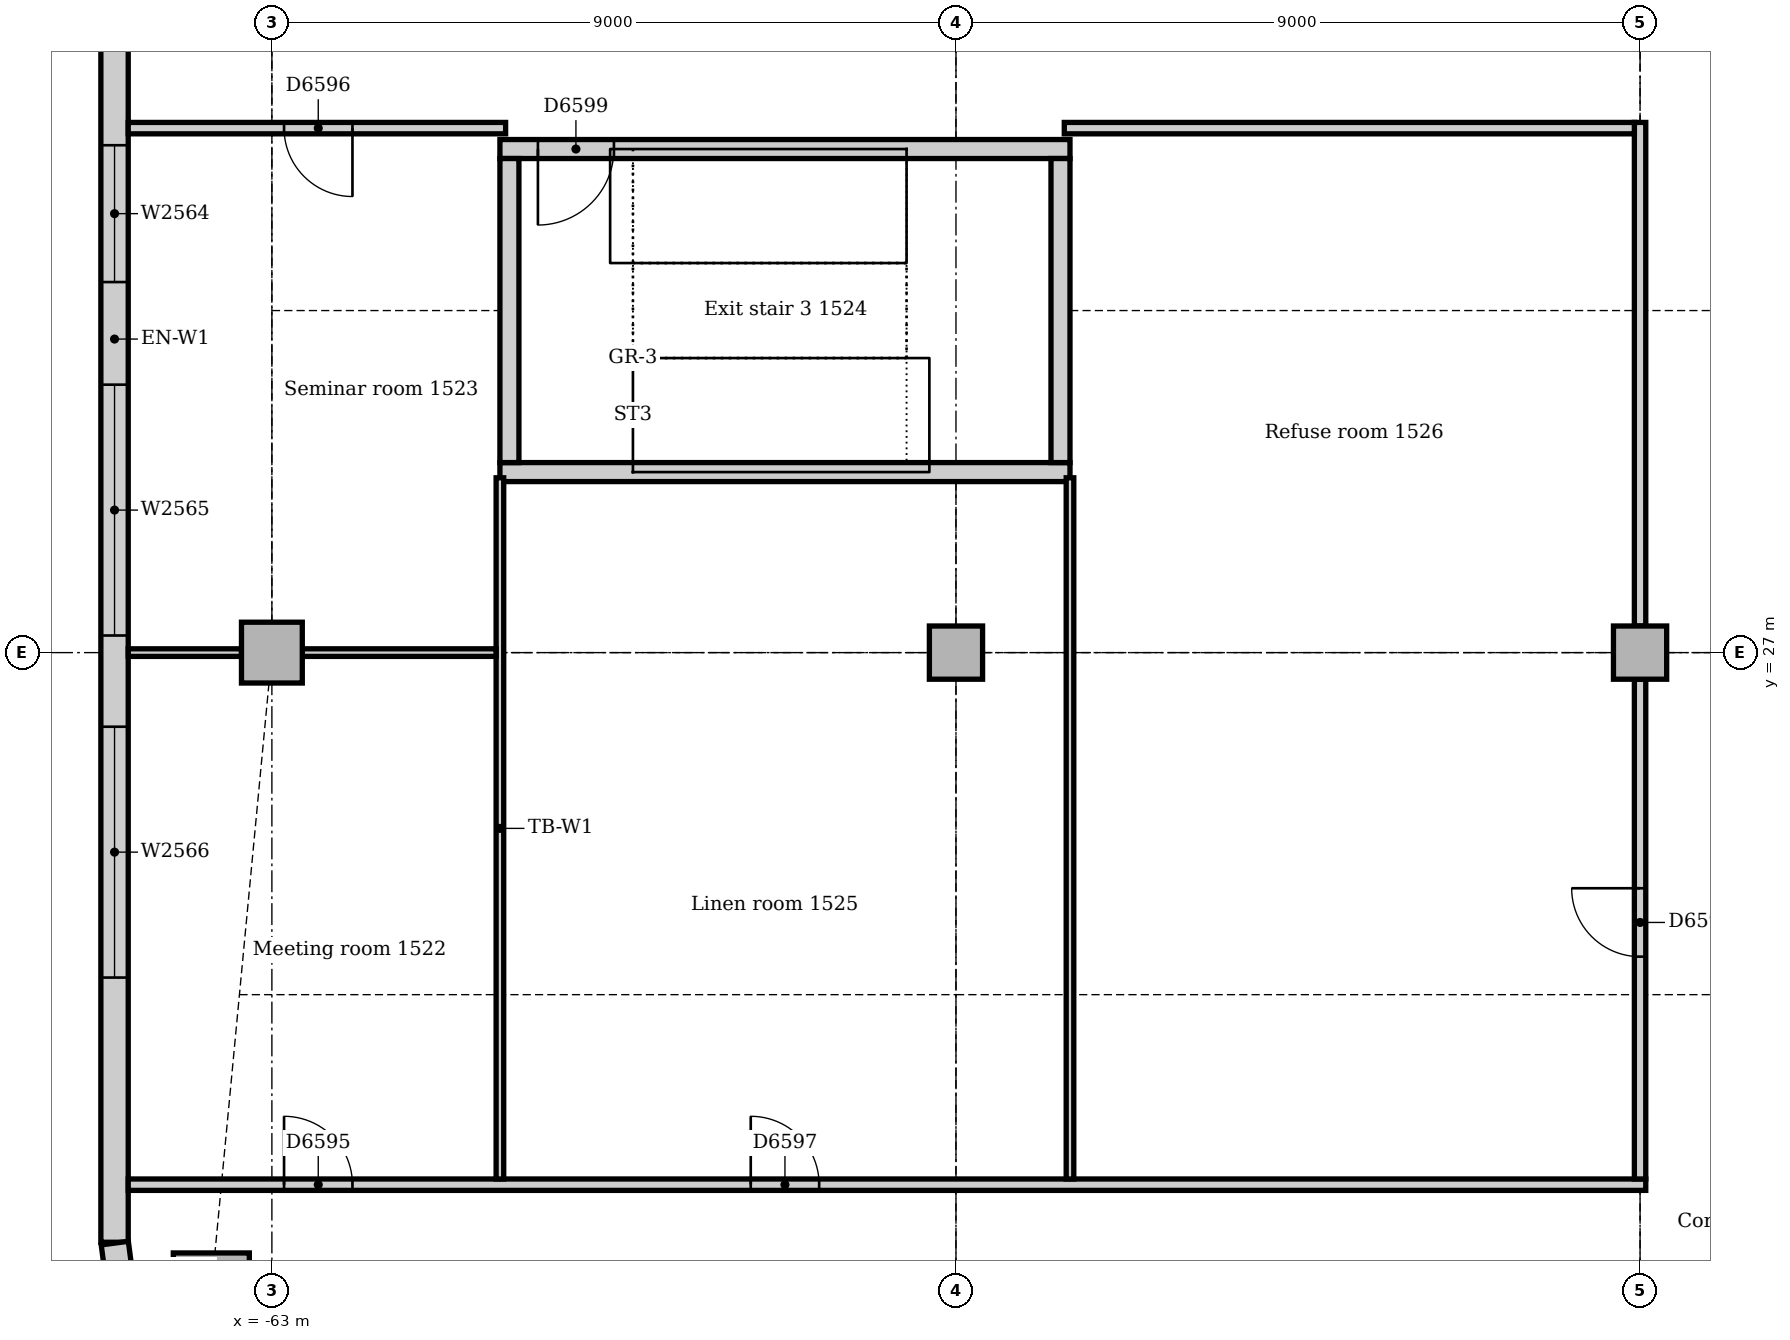
"""IFC4 building model, lengths in metres.
Left out: names, types, materials, properties, quantities, classifications, styles, units other than length and angle.
Written with IfcOpenShell. Run it as: python <this file> out.ifc"""

import sys

from ifc_helpers import new_model, si_unit, direction, frame, frame_2d, origin, origin_2d, place, context, subcontext, project, spatial, rectangle, extrude, element, fill, save


model = new_model("IFC4")
c1 = context("Model", 3, precision=1e-05, world=origin(), true_north=direction((0.0, 1.0)))
c2 = subcontext(c1, "Body", "Model", "MODEL_VIEW")
j1 = project(units=[si_unit("LENGTHUNIT", "METRE"), si_unit("PLANEANGLEUNIT", "RADIAN")], contexts=[c1])
p1 = place(None, origin())
s1 = spatial("IfcSite", under=j1, at=p1, CompositionType="ELEMENT")
p2 = place(p1, origin())
s2 = spatial("IfcBuilding", under=s1, at=p2, CompositionType="ELEMENT")
p3 = place(p2, frame((0.0, 0.0, 67.0)))
s3 = spatial("IfcBuildingStorey", under=s2, at=p3, CompositionType="ELEMENT", Elevation=67.0)
p4 = place(p3, frame((-60.0, 29.375, 0.0), z_axis=(0.0, 0.0, 1.0), x_axis=(1.0, 0.0, 0.0)))
e1 = element("IfcWall", 1, at=p4, inside=s3, PredefinedType="SOLIDWALL", context=c2, shape_type="SweptSolid", body=[
    extrude(rectangle(XDim=7.5, YDim=0.25, at=frame_2d((3.75, 0.0))), origin(), (0.0, 0.0, 1.0), 4.0),
])
p5 = place(p3, frame((-52.5, 33.625, 0.0), z_axis=(0.0, 0.0, 1.0), x_axis=(-1.0, 0.0, 0.0)))
e2 = element("IfcWall", 2, at=p5, inside=s3, PredefinedType="SOLIDWALL", context=c2, shape_type="SweptSolid", body=[
    extrude(rectangle(XDim=7.5, YDim=0.25, at=frame_2d((3.75, 0.0))), origin(), (0.0, 0.0, 1.0), 4.0),
])
p6 = place(p5, frame((6.0, 0.0, 0.0)))
e3 = element("IfcOpeningElement", 3, at=p6, cuts=e2, PredefinedType="OPENING", context=c2, shape_type="SweptSolid", body=[
    extrude(rectangle(XDim=1.0, YDim=2.1, at=frame_2d((0.5, 1.05))), frame((0.0, 0.135, 0.0), z_axis=(0.0, -1.0, 0.0), x_axis=(1.0, 0.0, 0.0)), (0.0, 0.0, 1.0), 0.27),
])
for number, where, z_axis, x_axis in (
    (4, (-52.625, 29.5, 0.0), (0.0, 0.0, 1.0), (0.0, 1.0, 0.0)),
    (5, (-59.875, 33.5, 0.0), (0.0, 0.0, 1.0), (0.0, -1.0, 0.0)),
):
    element("IfcWall", number, at=place(p3, frame(where, z_axis=z_axis, x_axis=x_axis)), inside=s3, PredefinedType="SOLIDWALL", context=c2, shape_type="SweptSolid", body=[
        extrude(rectangle(XDim=4.0, YDim=0.25, at=frame_2d((2.0, 0.0))), origin(), (0.0, 0.0, 1.0), 4.0),
    ])
p7 = place(p3, frame((-63.797, 18.602, 0.0), z_axis=(0.0, 0.0, 1.0), x_axis=(1.0, 0.0, 0.0)))
e6 = element("IfcColumn", 6, at=p7, inside=s3, PredefinedType="COLUMN", context=c2, shape_type="SweptSolid", body=[
    extrude(rectangle(XDim=1.0, YDim=1.0, at=origin_2d()), origin(), (0.0, 0.0, 1.0), 3.85),
])
p8 = place(p3, frame((-63.0, 27.0, 0.0), z_axis=(0.0, 0.0, 1.0), x_axis=(1.0, 0.0, 0.0)))
e7 = element("IfcColumn", 7, at=p8, inside=s3, PredefinedType="COLUMN", context=c2, shape_type="SweptSolid", body=[
    extrude(rectangle(XDim=0.8, YDim=0.8, at=origin_2d()), origin(), (0.0, 0.0, 1.0), 3.85),
])
for number, where, z_axis, x_axis in (
    (8, (-54.0, 27.0, 0.0), (0.0, 0.0, 1.0), (1.0, 0.0, 0.0)),
    (9, (-45.0, 27.0, 0.0), (0.0, 0.0, 1.0), (1.0, 0.0, 0.0)),
):
    element("IfcColumn", number, at=place(p3, frame(where, z_axis=z_axis, x_axis=x_axis)), inside=s3, PredefinedType="COLUMN", context=c2, shape_type="SweptSolid", body=[
        extrude(rectangle(XDim=0.7, YDim=0.7, at=origin_2d()), origin(), (0.0, 0.0, 1.0), 3.85),
    ])
p9 = place(p3, frame((-65.07, 43.007, 0.0), z_axis=(0.0, 0.0, 1.0), x_axis=(0.0, -1.0, 0.0)))
e10 = element("IfcWall", 10, at=p9, inside=s3, PredefinedType="STANDARD", context=c2, shape_type="SweptSolid", body=[
    extrude(rectangle(XDim=23.765, YDim=0.36, at=frame_2d((11.882, 0.0))), origin(), (0.0, 0.0, 1.0), 3.85),
])
p10 = place(p9, frame((4.232, 0.0, 0.9)))
e11 = element("IfcOpeningElement", 11, at=p10, cuts=e10, PredefinedType="OPENING", context=c2, shape_type="SweptSolid", body=[
    extrude(rectangle(XDim=1.8, YDim=1.6, at=frame_2d((0.9, 0.8))), frame((0.0, 0.19, 0.0), z_axis=(0.0, -1.0, 0.0), x_axis=(1.0, 0.0, 0.0)), (0.0, 0.0, 1.0), 0.38),
])
p11 = place(p9, frame((9.332, 0.0, 0.9)))
e12 = element("IfcOpeningElement", 12, at=p11, cuts=e10, PredefinedType="OPENING", context=c2, shape_type="SweptSolid", body=[
    extrude(rectangle(XDim=1.8, YDim=1.6, at=frame_2d((0.9, 0.8))), frame((0.0, 0.19, 0.0), z_axis=(0.0, -1.0, 0.0), x_axis=(1.0, 0.0, 0.0)), (0.0, 0.0, 1.0), 0.38),
])
p12 = place(p9, frame((12.482, 0.0, 0.9)))
e13 = element("IfcOpeningElement", 13, at=p12, cuts=e10, PredefinedType="OPENING", context=c2, shape_type="SweptSolid", body=[
    extrude(rectangle(XDim=3.3, YDim=1.6, at=frame_2d((1.65, 0.8))), frame((0.0, 0.19, 0.0), z_axis=(0.0, -1.0, 0.0), x_axis=(1.0, 0.0, 0.0)), (0.0, 0.0, 1.0), 0.38),
])
p13 = place(p9, frame((16.982, 0.0, 0.9)))
e14 = element("IfcOpeningElement", 14, at=p13, cuts=e10, PredefinedType="OPENING", context=c2, shape_type="SweptSolid", body=[
    extrude(rectangle(XDim=3.3, YDim=1.6, at=frame_2d((1.65, 0.8))), frame((0.0, 0.19, 0.0), z_axis=(0.0, -1.0, 0.0), x_axis=(1.0, 0.0, 0.0)), (0.0, 0.0, 1.0), 0.38),
])
p14 = place(p3, frame((-65.067, 19.231, 0.0), z_axis=(0.0, 0.0, 1.0), x_axis=(0.13055608231, -0.99144092581, 0.0)))
e15 = element("IfcWall", 15, at=p14, inside=s3, PredefinedType="STANDARD", context=c2, shape_type="SweptSolid", body=[
    extrude(rectangle(XDim=0.713, YDim=0.36, at=frame_2d((0.356, 0.0))), origin(), (0.0, 0.0, 1.0), 3.85),
])
p15 = place(p3, frame((-64.89, 20.0, 0.0), z_axis=(0.0, 0.0, 1.0), x_axis=(1.0, 0.0, 0.0)))
e16 = element("IfcWall", 16, at=p15, inside=s3, PredefinedType="PARTITIONING", context=c2, shape_type="SweptSolid", body=[
    extrude(rectangle(XDim=19.965, YDim=0.15, at=frame_2d((9.982, 0.0))), origin(), (0.0, 0.0, 1.0), 3.85),
])
p16 = place(p15, frame((2.05, 0.0, 0.0)))
e17 = element("IfcOpeningElement", 17, at=p16, cuts=e16, PredefinedType="OPENING", context=c2, shape_type="SweptSolid", body=[
    extrude(rectangle(XDim=0.9, YDim=2.1, at=frame_2d((0.45, 1.05))), frame((0.0, 0.085, 0.0), z_axis=(0.0, -1.0, 0.0), x_axis=(1.0, 0.0, 0.0)), (0.0, 0.0, 1.0), 0.17),
])
p17 = place(p15, frame((8.19, 0.0, 0.0)))
e18 = element("IfcOpeningElement", 18, at=p17, cuts=e16, PredefinedType="OPENING", context=c2, shape_type="SweptSolid", body=[
    extrude(rectangle(XDim=0.9, YDim=2.1, at=frame_2d((0.45, 1.05))), frame((0.0, 0.085, 0.0), z_axis=(0.0, -1.0, 0.0), x_axis=(1.0, 0.0, 0.0)), (0.0, 0.0, 1.0), 0.17),
])
p18 = place(p3, frame((-45.0, 20.075, 0.0), z_axis=(0.0, 0.0, 1.0), x_axis=(0.0, 1.0, 0.0)))
e19 = element("IfcWall", 19, at=p18, inside=s3, PredefinedType="PARTITIONING", context=c2, shape_type="SweptSolid", body=[
    extrude(rectangle(XDim=6.575, YDim=0.15, at=frame_2d((3.288, 0.0))), origin(), (0.0, 0.0, 1.0), 3.256),
])
p19 = place(p18, frame((2.925, 0.0, 0.0)))
e20 = element("IfcOpeningElement", 20, at=p19, cuts=e19, PredefinedType="OPENING", context=c2, shape_type="SweptSolid", body=[
    extrude(rectangle(XDim=0.9, YDim=2.1, at=frame_2d((0.45, 1.05))), frame((0.0, 0.085, 0.0), z_axis=(0.0, -1.0, 0.0), x_axis=(1.0, 0.0, 0.0)), (0.0, 0.0, 1.0), 0.17),
])
p20 = place(p3, frame((-45.0, 27.35, 0.0), z_axis=(0.0, 0.0, 1.0), x_axis=(0.0, 1.0, 0.0)))
e21 = element("IfcWall", 21, at=p20, inside=s3, PredefinedType="PARTITIONING", context=c2, shape_type="SweptSolid", body=[
    extrude(rectangle(XDim=6.625, YDim=0.15, at=frame_2d((3.312, 0.0))), origin(), (0.0, 0.0, 1.0), 3.256),
])
p21 = place(p3, frame((-52.575, 33.9, 0.0), z_axis=(0.0, 0.0, 1.0), x_axis=(1.0, 0.0, 0.0)))
e22 = element("IfcWall", 22, at=p21, inside=s3, PredefinedType="PARTITIONING", context=c2, shape_type="SweptSolid", body=[
    extrude(rectangle(XDim=7.5, YDim=0.15, at=frame_2d((3.75, 0.0))), origin(), (0.0, 0.0, 1.0), 3.85),
])
p22 = place(p3, frame((-64.89, 33.9, 0.0), z_axis=(0.0, 0.0, 1.0), x_axis=(1.0, 0.0, 0.0)))
e23 = element("IfcWall", 23, at=p22, inside=s3, PredefinedType="PARTITIONING", context=c2, shape_type="SweptSolid", body=[
    extrude(rectangle(XDim=4.965, YDim=0.15, at=frame_2d((2.482, 0.0))), origin(), (0.0, 0.0, 1.0), 3.85),
])
p23 = place(p22, frame((2.05, 0.0, 0.0)))
e24 = element("IfcOpeningElement", 24, at=p23, cuts=e23, PredefinedType="OPENING", context=c2, shape_type="SweptSolid", body=[
    extrude(rectangle(XDim=0.9, YDim=2.1, at=frame_2d((0.45, 1.05))), frame((0.0, 0.085, 0.0), z_axis=(0.0, -1.0, 0.0), x_axis=(1.0, 0.0, 0.0)), (0.0, 0.0, 1.0), 0.17),
])
for number, where, z_axis, x_axis in (
    (25, (-60.0, 20.075, 0.0), (0.0, 0.0, 1.0), (0.0, 1.0, 0.0)),
    (26, (-52.5, 20.075, 0.0), (0.0, 0.0, 1.0), (0.0, 1.0, 0.0)),
):
    element("IfcWall", number, at=place(p3, frame(where, z_axis=z_axis, x_axis=x_axis)), inside=s3, PredefinedType="PARTITIONING", context=c2, shape_type="SweptSolid", body=[
        extrude(rectangle(XDim=9.225, YDim=0.1, at=frame_2d((4.612, 0.0))), origin(), (0.0, 0.0, 1.0), 3.85),
    ])
p24 = place(p3, frame((-62.6, 27.0, 0.0), z_axis=(0.0, 0.0, 1.0), x_axis=(1.0, 0.0, 0.0)))
e27 = element("IfcWall", 27, at=p24, inside=s3, PredefinedType="PARTITIONING", context=c2, shape_type="SweptSolid", body=[
    extrude(rectangle(XDim=2.55, YDim=0.1, at=frame_2d((1.275, 0.0))), origin(), (0.0, 0.0, 1.0), 3.158),
])
p25 = place(p3, frame((-64.89, 27.0, 0.0), z_axis=(0.0, 0.0, 1.0), x_axis=(1.0, 0.0, 0.0)))
e28 = element("IfcWall", 28, at=p25, inside=s3, PredefinedType="PARTITIONING", context=c2, shape_type="SweptSolid", body=[
    extrude(rectangle(XDim=1.49, YDim=0.1, at=frame_2d((0.745, 0.0))), origin(), (0.0, 0.0, 1.0), 3.85),
])
p26 = place(p11, origin())
e29 = element("IfcWindow", 29, at=p26, inside=s3, PartitioningType="SINGLE_PANEL", PredefinedType="WINDOW", context=c2, shape_type="SweptSolid", body=[
    extrude(rectangle(XDim=1.8, YDim=1.6, at=frame_2d((0.9, 0.8))), frame((0.0, 0.13, 0.0), z_axis=(0.0, -1.0, 0.0), x_axis=(1.0, 0.0, 0.0)), (0.0, 0.0, 1.0), 0.06),
])
fill(e12, e29)
p27 = place(p12, origin())
e30 = element("IfcWindow", 30, at=p27, inside=s3, PartitioningType="SINGLE_PANEL", PredefinedType="WINDOW", context=c2, shape_type="SweptSolid", body=[
    extrude(rectangle(XDim=3.3, YDim=1.6, at=frame_2d((1.65, 0.8))), frame((0.0, 0.13, 0.0), z_axis=(0.0, -1.0, 0.0), x_axis=(1.0, 0.0, 0.0)), (0.0, 0.0, 1.0), 0.06),
])
fill(e13, e30)
p28 = place(p13, origin())
e31 = element("IfcWindow", 31, at=p28, inside=s3, PartitioningType="SINGLE_PANEL", PredefinedType="WINDOW", context=c2, shape_type="SweptSolid", body=[
    extrude(rectangle(XDim=3.3, YDim=1.6, at=frame_2d((1.65, 0.8))), frame((0.0, 0.13, 0.0), z_axis=(0.0, -1.0, 0.0), x_axis=(1.0, 0.0, 0.0)), (0.0, 0.0, 1.0), 0.06),
])
fill(e14, e31)
p29 = place(p16, origin())
e32 = element("IfcDoor", 32, at=p29, inside=s3, OperationType="SINGLE_SWING_LEFT", PredefinedType="DOOR", context=c2, shape_type="SweptSolid", body=[
    extrude(rectangle(XDim=0.9, YDim=2.1, at=frame_2d((0.45, 1.05))), frame((0.0, 0.025, 0.0), z_axis=(0.0, -1.0, 0.0), x_axis=(1.0, 0.0, 0.0)), (0.0, 0.0, 1.0), 0.05),
])
fill(e17, e32)
p30 = place(p23, frame((0.9, 0.0, 0.0), z_axis=(0.0, 0.0, 1.0), x_axis=(-1.0, 0.0, 0.0)))
e33 = element("IfcDoor", 33, at=p30, inside=s3, OperationType="SINGLE_SWING_LEFT", PredefinedType="DOOR", context=c2, shape_type="SweptSolid", body=[
    extrude(rectangle(XDim=0.9, YDim=2.1, at=frame_2d((0.45, 1.05))), frame((0.0, 0.025, 0.0), z_axis=(0.0, -1.0, 0.0), x_axis=(1.0, 0.0, 0.0)), (0.0, 0.0, 1.0), 0.05),
])
fill(e24, e33)
p31 = place(p17, origin())
e34 = element("IfcDoor", 34, at=p31, inside=s3, OperationType="SINGLE_SWING_LEFT", PredefinedType="DOOR", context=c2, shape_type="SweptSolid", body=[
    extrude(rectangle(XDim=0.9, YDim=2.1, at=frame_2d((0.45, 1.05))), frame((0.0, 0.025, 0.0), z_axis=(0.0, -1.0, 0.0), x_axis=(1.0, 0.0, 0.0)), (0.0, 0.0, 1.0), 0.05),
])
fill(e18, e34)
p32 = place(p19, origin())
e35 = element("IfcDoor", 35, at=p32, inside=s3, OperationType="SINGLE_SWING_RIGHT", PredefinedType="DOOR", context=c2, shape_type="SweptSolid", body=[
    extrude(rectangle(XDim=0.9, YDim=2.1, at=frame_2d((0.45, 1.05))), frame((0.0, 0.025, 0.0), z_axis=(0.0, -1.0, 0.0), x_axis=(1.0, 0.0, 0.0)), (0.0, 0.0, 1.0), 0.05),
])
fill(e20, e35)
p33 = place(p6, origin())
e36 = element("IfcDoor", 36, at=p33, inside=s3, OperationType="SINGLE_SWING_RIGHT", PredefinedType="DOOR", context=c2, shape_type="SweptSolid", body=[
    extrude(rectangle(XDim=1.0, YDim=2.1, at=frame_2d((0.5, 1.05))), frame((0.0, 0.025, 0.0), z_axis=(0.0, -1.0, 0.0), x_axis=(1.0, 0.0, 0.0)), (0.0, 0.0, 1.0), 0.05),
])
fill(e3, e36)
save(model, sys.argv[1])
